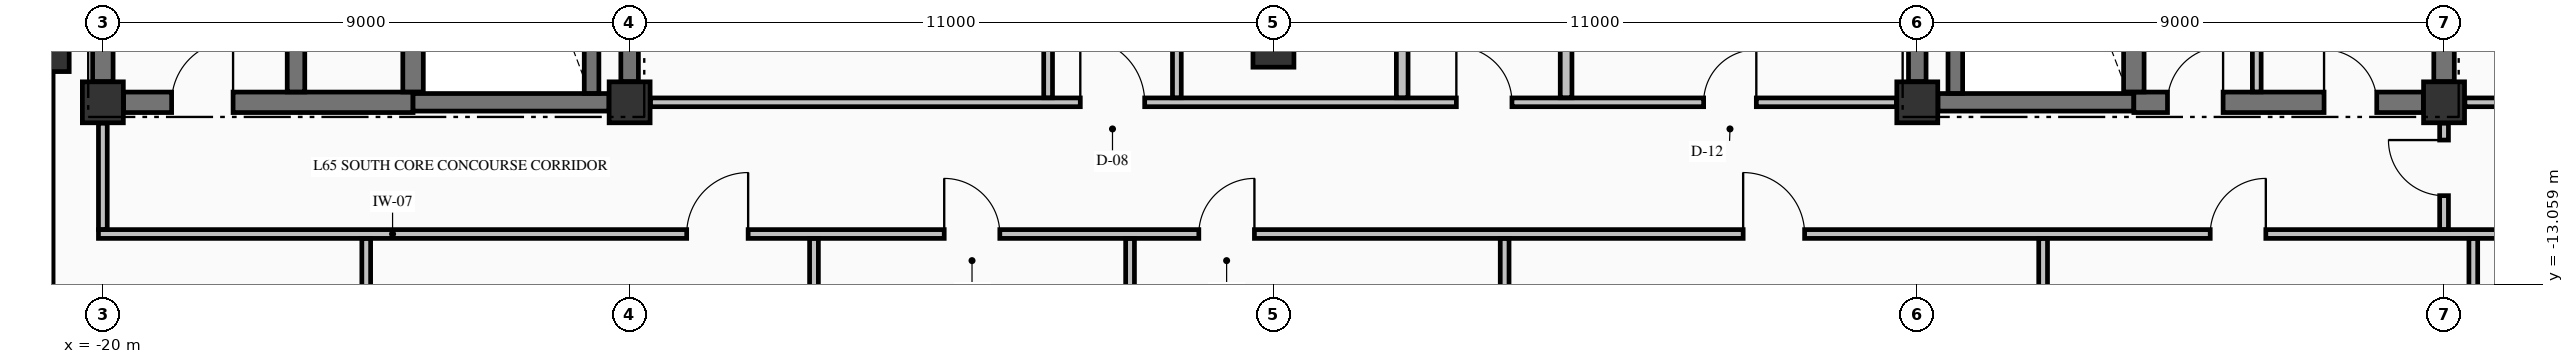
"""IFC4 building model, lengths in metres.
Left out: names, types, materials, properties, quantities, classifications, styles, units other than length and angle.
Written with IfcOpenShell. Run it as: python <this file> out.ifc"""

import sys

from ifc_helpers import new_model, si_unit, direction, frame, frame_2d, origin, origin_2d, place, context, subcontext, project, spatial, rectangle, extrude, element, fill, save


model = new_model("IFC4")
c1 = context("Model", 3, precision=1e-05, world=origin(), true_north=direction((0.0, 1.0)))
c2 = subcontext(c1, "Body", "Model", "MODEL_VIEW")
j1 = project(units=[si_unit("LENGTHUNIT", "METRE"), si_unit("PLANEANGLEUNIT", "RADIAN")], contexts=[c1])
p1 = place(None, origin())
s1 = spatial("IfcSite", under=j1, at=p1, CompositionType="ELEMENT")
p2 = place(p1, origin())
s2 = spatial("IfcBuilding", under=s1, at=p2, CompositionType="ELEMENT")
p3 = place(p2, frame((0.0, 0.0, 246.2)))
s3 = spatial("IfcBuildingStorey", under=s2, at=p3, CompositionType="ELEMENT", Elevation=246.2)
p4 = place(p3, frame((-21.0, -9.0, -0.25), z_axis=(0.0, 0.0, 1.0), x_axis=(1.0, 0.0, 0.0)))
e1 = element("IfcColumn", 1, at=p4, inside=s3, PredefinedType="COLUMN", context=c2, shape_type="SweptSolid", body=[
    extrude(rectangle(XDim=0.85, YDim=0.85, at=origin_2d()), origin(), (0.0, 0.0, 1.0), 3.055),
])
for number, where, z_axis, x_axis in (
    (2, (-20.0, -9.95, -0.25), (0.0, 0.0, 1.0), (1.0, 0.0, 0.0)),
    (3, (-11.0, -9.95, -0.25), (0.0, 0.0, 1.0), (1.0, 0.0, 0.0)),
    (4, (11.0, -9.95, -0.25), (0.0, 0.0, 1.0), (1.0, 0.0, 0.0)),
    (5, (20.0, -9.95, -0.25), (0.0, 0.0, 1.0), (1.0, 0.0, 0.0)),
    (6, (0.0, -9.0, -0.25), (0.0, 0.0, 1.0), (1.0, 0.0, 0.0)),
):
    element("IfcColumn", number, at=place(p3, frame(where, z_axis=z_axis, x_axis=x_axis)), inside=s3, PredefinedType="COLUMN", context=c2, shape_type="SweptSolid", body=[
        extrude(rectangle(XDim=0.7, YDim=0.7, at=origin_2d()), origin(), (0.0, 0.0, 1.0), 3.055),
    ])
p5 = place(p3, frame((-21.0, -9.455, 0.0), z_axis=(0.0, 0.0, 1.0), x_axis=(0.0, -1.0, 0.0)))
e7 = element("IfcWall", 7, at=p5, inside=s3, PredefinedType="STANDARD", context=c2, shape_type="SweptSolid", body=[
    extrude(rectangle(XDim=8.09, YDim=0.3, at=frame_2d((4.045, 0.0))), origin(), (0.0, 0.0, 1.0), 2.197),
])
p6 = place(p3, frame((-19.646, -9.95, 0.0), z_axis=(0.0, 0.0, 1.0), x_axis=(1.0, 0.0, 0.0)))
e8 = element("IfcWall", 8, at=p6, inside=s3, PredefinedType="SHEAR", context=c2, shape_type="SweptSolid", body=[
    extrude(rectangle(XDim=4.946, YDim=0.35, at=frame_2d((2.473, 0.0))), origin(), (0.0, 0.0, 1.0), 2.805),
])
p7 = place(p6, frame((0.821, 0.0, 0.0)))
e9 = element("IfcOpeningElement", 9, at=p7, cuts=e8, PredefinedType="OPENING", context=c2, shape_type="SweptSolid", body=[
    extrude(rectangle(XDim=1.05, YDim=2.15, at=frame_2d((0.525, 1.075))), frame((0.0, 0.185, 0.0), z_axis=(0.0, -1.0, 0.0), x_axis=(1.0, 0.0, 0.0)), (0.0, 0.0, 1.0), 0.37),
])
for number, where, z_axis, x_axis in (
    (10, (-14.7, -9.95, 0.0), (0.0, 0.0, 1.0), (1.0, 0.0, 0.0)),
    (11, (11.354, -9.95, 0.0), (0.0, 0.0, 1.0), (1.0, 0.0, 0.0)),
):
    element("IfcWall", number, at=place(p3, frame(where, z_axis=z_axis, x_axis=x_axis)), inside=s3, PredefinedType="SHEAR", context=c2, shape_type="SweptSolid", body=[
        extrude(rectangle(XDim=3.346, YDim=0.3, at=frame_2d((1.673, 0.0))), origin(), (0.0, 0.0, 1.0), 2.805),
    ])
p8 = place(p3, frame((14.7, -9.95, 0.0), z_axis=(0.0, 0.0, 1.0), x_axis=(1.0, 0.0, 0.0)))
e12 = element("IfcWall", 12, at=p8, inside=s3, PredefinedType="SHEAR", context=c2, shape_type="SweptSolid", body=[
    extrude(rectangle(XDim=4.946, YDim=0.35, at=frame_2d((2.473, 0.0))), origin(), (0.0, 0.0, 1.0), 2.805),
])
p9 = place(p8, frame((3.25, 0.0, 0.0)))
e13 = element("IfcOpeningElement", 13, at=p9, cuts=e12, PredefinedType="OPENING", context=c2, shape_type="SweptSolid", body=[
    extrude(rectangle(XDim=0.9, YDim=2.15, at=frame_2d((0.45, 1.075))), frame((0.0, 0.185, 0.0), z_axis=(0.0, -1.0, 0.0), x_axis=(1.0, 0.0, 0.0)), (0.0, 0.0, 1.0), 0.37),
])
p10 = place(p8, frame((0.575, 0.0, 0.0)))
e14 = element("IfcOpeningElement", 14, at=p10, cuts=e12, PredefinedType="OPENING", context=c2, shape_type="SweptSolid", body=[
    extrude(rectangle(XDim=0.95, YDim=2.15, at=frame_2d((0.475, 1.075))), frame((0.0, 0.185, 0.0), z_axis=(0.0, -1.0, 0.0), x_axis=(1.0, 0.0, 0.0)), (0.0, 0.0, 1.0), 0.37),
])
p11 = place(p3, frame((-20.075, -12.2, 0.0), z_axis=(0.0, 0.0, 1.0), x_axis=(1.0, 0.0, 0.0)))
e15 = element("IfcWall", 15, at=p11, inside=s3, PredefinedType="PARTITIONING", context=c2, shape_type="SweptSolid", body=[
    extrude(rectangle(XDim=45.91, YDim=0.15, at=frame_2d((22.955, 0.0))), origin(), (0.0, 0.0, 1.0), 2.805),
])
p12 = place(p11, frame((10.05, 0.0, 0.0)))
e16 = element("IfcOpeningElement", 16, at=p12, cuts=e15, PredefinedType="OPENING", context=c2, shape_type="SweptSolid", body=[
    extrude(rectangle(XDim=1.05, YDim=2.15, at=frame_2d((0.525, 1.075))), frame((0.0, 0.085, 0.0), z_axis=(0.0, -1.0, 0.0), x_axis=(1.0, 0.0, 0.0)), (0.0, 0.0, 1.0), 0.17),
])
p13 = place(p11, frame((14.45, 0.0, 0.0)))
e17 = element("IfcOpeningElement", 17, at=p13, cuts=e15, PredefinedType="OPENING", context=c2, shape_type="SweptSolid", body=[
    extrude(rectangle(XDim=0.95, YDim=2.15, at=frame_2d((0.475, 1.075))), frame((0.0, 0.085, 0.0), z_axis=(0.0, -1.0, 0.0), x_axis=(1.0, 0.0, 0.0)), (0.0, 0.0, 1.0), 0.17),
])
p14 = place(p11, frame((18.8, 0.0, 0.0)))
e18 = element("IfcOpeningElement", 18, at=p14, cuts=e15, PredefinedType="OPENING", context=c2, shape_type="SweptSolid", body=[
    extrude(rectangle(XDim=0.95, YDim=2.15, at=frame_2d((0.475, 1.075))), frame((0.0, 0.085, 0.0), z_axis=(0.0, -1.0, 0.0), x_axis=(1.0, 0.0, 0.0)), (0.0, 0.0, 1.0), 0.17),
])
p15 = place(p11, frame((28.1, 0.0, 0.0)))
e19 = element("IfcOpeningElement", 19, at=p15, cuts=e15, PredefinedType="OPENING", context=c2, shape_type="SweptSolid", body=[
    extrude(rectangle(XDim=1.05, YDim=2.15, at=frame_2d((0.525, 1.075))), frame((0.0, 0.085, 0.0), z_axis=(0.0, -1.0, 0.0), x_axis=(1.0, 0.0, 0.0)), (0.0, 0.0, 1.0), 0.17),
])
p16 = place(p11, frame((36.08, 0.0, 0.0)))
e20 = element("IfcOpeningElement", 20, at=p16, cuts=e15, PredefinedType="OPENING", context=c2, shape_type="SweptSolid", body=[
    extrude(rectangle(XDim=0.95, YDim=2.15, at=frame_2d((0.475, 1.075))), frame((0.0, 0.085, 0.0), z_axis=(0.0, -1.0, 0.0), x_axis=(1.0, 0.0, 0.0)), (0.0, 0.0, 1.0), 0.17),
])
p17 = place(p3, frame((-10.644, -9.95, 0.0), z_axis=(0.0, 0.0, 1.0), x_axis=(1.0, 0.0, 0.0)))
e21 = element("IfcWall", 21, at=p17, inside=s3, PredefinedType="PARTITIONING", context=c2, shape_type="SweptSolid", body=[
    extrude(rectangle(XDim=21.288, YDim=0.15, at=frame_2d((10.644, 0.0))), origin(), (0.0, 0.0, 1.0), 2.805),
])
p18 = place(p17, frame((7.344, 0.0, 0.0)))
e22 = element("IfcOpeningElement", 22, at=p18, cuts=e21, PredefinedType="OPENING", context=c2, shape_type="SweptSolid", body=[
    extrude(rectangle(XDim=1.1, YDim=2.15, at=frame_2d((0.55, 1.075))), frame((0.0, 0.085, 0.0), z_axis=(0.0, -1.0, 0.0), x_axis=(1.0, 0.0, 0.0)), (0.0, 0.0, 1.0), 0.17),
])
p19 = place(p17, frame((13.769, 0.0, 0.0)))
e23 = element("IfcOpeningElement", 23, at=p19, cuts=e21, PredefinedType="OPENING", context=c2, shape_type="SweptSolid", body=[
    extrude(rectangle(XDim=0.95, YDim=2.15, at=frame_2d((0.475, 1.075))), frame((0.0, 0.085, 0.0), z_axis=(0.0, -1.0, 0.0), x_axis=(1.0, 0.0, 0.0)), (0.0, 0.0, 1.0), 0.17),
])
p20 = place(p17, frame((17.994, 0.0, 0.0)))
e24 = element("IfcOpeningElement", 24, at=p20, cuts=e21, PredefinedType="OPENING", context=c2, shape_type="SweptSolid", body=[
    extrude(rectangle(XDim=0.9, YDim=2.15, at=frame_2d((0.45, 1.075))), frame((0.0, 0.085, 0.0), z_axis=(0.0, -1.0, 0.0), x_axis=(1.0, 0.0, 0.0)), (0.0, 0.0, 1.0), 0.17),
])
p21 = place(p3, frame((20.356, -9.95, 0.0), z_axis=(0.0, 0.0, 1.0), x_axis=(1.0, 0.0, 0.0)))
e25 = element("IfcWall", 25, at=p21, inside=s3, PredefinedType="PARTITIONING", context=c2, shape_type="SweptSolid", body=[
    extrude(rectangle(XDim=5.479, YDim=0.15, at=frame_2d((2.74, 0.0))), origin(), (0.0, 0.0, 1.0), 2.805),
])
p22 = place(p21, frame((2.169, 0.0, 0.0)))
e26 = element("IfcOpeningElement", 26, at=p22, cuts=e25, PredefinedType="OPENING", context=c2, shape_type="SweptSolid", body=[
    extrude(rectangle(XDim=0.95, YDim=2.15, at=frame_2d((0.475, 1.075))), frame((0.0, 0.085, 0.0), z_axis=(0.0, -1.0, 0.0), x_axis=(1.0, 0.0, 0.0)), (0.0, 0.0, 1.0), 0.17),
])
p23 = place(p3, frame((-20.0, -9.596, 0.0), z_axis=(0.0, 0.0, 1.0), x_axis=(0.0, 1.0, 0.0)))
e27 = element("IfcWall", 27, at=p23, inside=s3, PredefinedType="SHEAR", context=c2, shape_type="SweptSolid", body=[
    extrude(rectangle(XDim=9.194, YDim=0.35, at=frame_2d((4.597, 0.0))), origin(), (0.0, 0.0, 1.0), 2.805),
])
p24 = place(p3, frame((-16.7, -9.773, 0.0), z_axis=(0.0, 0.0, 1.0), x_axis=(0.0, 1.0, 0.0)))
e28 = element("IfcWall", 28, at=p24, inside=s3, PredefinedType="SHEAR", context=c2, shape_type="SweptSolid", body=[
    extrude(rectangle(XDim=9.371, YDim=0.3, at=frame_2d((4.686, 0.0))), origin(), (0.0, 0.0, 1.0), 2.805),
])
p25 = place(p3, frame((-14.7, -9.773, 0.0), z_axis=(0.0, 0.0, 1.0), x_axis=(0.0, 1.0, 0.0)))
e29 = element("IfcWall", 29, at=p25, inside=s3, PredefinedType="SHEAR", context=c2, shape_type="SweptSolid", body=[
    extrude(rectangle(XDim=9.371, YDim=0.35, at=frame_2d((4.686, 0.0))), origin(), (0.0, 0.0, 1.0), 2.805),
])
p26 = place(p3, frame((-11.65, -9.798, 0.0), z_axis=(0.0, 0.0, 1.0), x_axis=(0.0, 1.0, 0.0)))
e30 = element("IfcWall", 30, at=p26, inside=s3, PredefinedType="SOLIDWALL", context=c2, shape_type="SweptSolid", body=[
    extrude(rectangle(XDim=9.396, YDim=0.25, at=frame_2d((4.698, 0.0))), origin(), (0.0, 0.0, 1.0), 2.805),
])
for number, where, z_axis, x_axis in (
    (31, (-11.0, -9.596, 0.0), (0.0, 0.0, 1.0), (0.0, 1.0, 0.0)),
    (32, (11.0, -9.596, 0.0), (0.0, 0.0, 1.0), (0.0, 1.0, 0.0)),
):
    element("IfcWall", number, at=place(p3, frame(where, z_axis=z_axis, x_axis=x_axis)), inside=s3, PredefinedType="SHEAR", context=c2, shape_type="SweptSolid", body=[
        extrude(rectangle(XDim=9.242, YDim=0.3, at=frame_2d((4.621, 0.0))), origin(), (0.0, 0.0, 1.0), 2.805),
    ])
p27 = place(p3, frame((11.65, -9.798, 0.0), z_axis=(0.0, 0.0, 1.0), x_axis=(0.0, 1.0, 0.0)))
e33 = element("IfcWall", 33, at=p27, inside=s3, PredefinedType="SOLIDWALL", context=c2, shape_type="SweptSolid", body=[
    extrude(rectangle(XDim=9.396, YDim=0.25, at=frame_2d((4.698, 0.0))), origin(), (0.0, 0.0, 1.0), 2.805),
])
p28 = place(p3, frame((14.7, -9.773, 0.0), z_axis=(0.0, 0.0, 1.0), x_axis=(0.0, 1.0, 0.0)))
e34 = element("IfcWall", 34, at=p28, inside=s3, PredefinedType="SHEAR", context=c2, shape_type="SweptSolid", body=[
    extrude(rectangle(XDim=9.371, YDim=0.35, at=frame_2d((4.686, 0.0))), origin(), (0.0, 0.0, 1.0), 2.805),
])
p29 = place(p3, frame((20.0, -9.596, 0.0), z_axis=(0.0, 0.0, 1.0), x_axis=(0.0, 1.0, 0.0)))
e35 = element("IfcWall", 35, at=p29, inside=s3, PredefinedType="SHEAR", context=c2, shape_type="SweptSolid", body=[
    extrude(rectangle(XDim=9.242, YDim=0.35, at=frame_2d((4.621, 0.0))), origin(), (0.0, 0.0, 1.0), 2.805),
])
p30 = place(p3, frame((-20.0, -12.122, 0.0), z_axis=(0.0, 0.0, 1.0), x_axis=(0.0, 1.0, 0.0)))
e36 = element("IfcWall", 36, at=p30, inside=s3, PredefinedType="PARTITIONING", context=c2, shape_type="SweptSolid", body=[
    extrude(rectangle(XDim=1.816, YDim=0.15, at=frame_2d((0.908, 0.0))), origin(), (0.0, 0.0, 1.0), 2.395),
])
p31 = place(p3, frame((-15.5, -17.569, 0.0), z_axis=(0.0, 0.0, 1.0), x_axis=(0.0, 1.0, 0.0)))
e37 = element("IfcWall", 37, at=p31, inside=s3, PredefinedType="PARTITIONING", context=c2, shape_type="SweptSolid", body=[
    extrude(rectangle(XDim=5.291, YDim=0.15, at=frame_2d((2.646, 0.0))), origin(), (0.0, 0.0, 1.0), 2.805),
])
p32 = place(p3, frame((-7.85, -23.335, 0.0), z_axis=(0.0, 0.0, 1.0), x_axis=(0.0, 1.0, 0.0)))
e38 = element("IfcWall", 38, at=p32, inside=s3, PredefinedType="PARTITIONING", context=c2, shape_type="SweptSolid", body=[
    extrude(rectangle(XDim=11.057, YDim=0.15, at=frame_2d((5.528, 0.0))), origin(), (0.0, 0.0, 1.0), 2.805),
])
p33 = place(p3, frame((-3.85, -9.872, 0.0), z_axis=(0.0, 0.0, 1.0), x_axis=(0.0, 1.0, 0.0)))
e39 = element("IfcWall", 39, at=p33, inside=s3, PredefinedType="PARTITIONING", context=c2, shape_type="SweptSolid", body=[
    extrude(rectangle(XDim=9.544, YDim=0.15, at=frame_2d((4.772, 0.0))), origin(), (0.0, 0.0, 1.0), 2.805),
])
p34 = place(p3, frame((-2.45, -23.335, 0.0), z_axis=(0.0, 0.0, 1.0), x_axis=(0.0, 1.0, 0.0)))
e40 = element("IfcWall", 40, at=p34, inside=s3, PredefinedType="PARTITIONING", context=c2, shape_type="SweptSolid", body=[
    extrude(rectangle(XDim=11.057, YDim=0.15, at=frame_2d((5.528, 0.0))), origin(), (0.0, 0.0, 1.0), 2.805),
])
p35 = place(p3, frame((-1.65, -9.872, 0.0), z_axis=(0.0, 0.0, 1.0), x_axis=(0.0, 1.0, 0.0)))
e41 = element("IfcWall", 41, at=p35, inside=s3, PredefinedType="PARTITIONING", context=c2, shape_type="SweptSolid", body=[
    extrude(rectangle(XDim=4.419, YDim=0.15, at=frame_2d((2.209, 0.0))), origin(), (0.0, 0.0, 1.0), 2.805),
])
p36 = place(p35, frame((2.597, 0.0, 0.0)))
e42 = element("IfcOpeningElement", 42, at=p36, cuts=e41, PredefinedType="OPENING", context=c2, shape_type="SweptSolid", body=[
    extrude(rectangle(XDim=0.95, YDim=2.15, at=frame_2d((0.475, 1.075))), frame((0.0, 0.085, 0.0), z_axis=(0.0, -1.0, 0.0), x_axis=(1.0, 0.0, 0.0)), (0.0, 0.0, 1.0), 0.17),
])
p37 = place(p3, frame((2.2, -9.872, 0.0), z_axis=(0.0, 0.0, 1.0), x_axis=(0.0, 1.0, 0.0)))
e43 = element("IfcWall", 43, at=p37, inside=s3, PredefinedType="PARTITIONING", context=c2, shape_type="SweptSolid", body=[
    extrude(rectangle(XDim=4.419, YDim=0.2, at=frame_2d((2.209, 0.0))), origin(), (0.0, 0.0, 1.0), 2.805),
])
p38 = place(p3, frame((3.95, -23.335, 0.0), z_axis=(0.0, 0.0, 1.0), x_axis=(0.0, 1.0, 0.0)))
e44 = element("IfcWall", 44, at=p38, inside=s3, PredefinedType="PARTITIONING", context=c2, shape_type="SweptSolid", body=[
    extrude(rectangle(XDim=11.057, YDim=0.15, at=frame_2d((5.528, 0.0))), origin(), (0.0, 0.0, 1.0), 2.805),
])
p39 = place(p3, frame((5.0, -9.872, 0.0), z_axis=(0.0, 0.0, 1.0), x_axis=(0.0, 1.0, 0.0)))
e45 = element("IfcWall", 45, at=p39, inside=s3, PredefinedType="PARTITIONING", context=c2, shape_type="SweptSolid", body=[
    extrude(rectangle(XDim=4.419, YDim=0.2, at=frame_2d((2.209, 0.0))), origin(), (0.0, 0.0, 1.0), 2.805),
])
p40 = place(p3, frame((13.15, -23.335, 0.0), z_axis=(0.0, 0.0, 1.0), x_axis=(0.0, 1.0, 0.0)))
e46 = element("IfcWall", 46, at=p40, inside=s3, PredefinedType="PARTITIONING", context=c2, shape_type="SweptSolid", body=[
    extrude(rectangle(XDim=11.057, YDim=0.15, at=frame_2d((5.528, 0.0))), origin(), (0.0, 0.0, 1.0), 2.805),
])
p41 = place(p3, frame((16.8, -9.772, 0.0), z_axis=(0.0, 0.0, 1.0), x_axis=(0.0, 1.0, 0.0)))
e47 = element("IfcWall", 47, at=p41, inside=s3, PredefinedType="PARTITIONING", context=c2, shape_type="SweptSolid", body=[
    extrude(rectangle(XDim=7.194, YDim=0.15, at=frame_2d((3.597, 0.0))), origin(), (0.0, 0.0, 1.0), 2.805),
])
p42 = place(p3, frame((20.0, -12.122, 0.0), z_axis=(0.0, 0.0, 1.0), x_axis=(0.0, 1.0, 0.0)))
e48 = element("IfcWall", 48, at=p42, inside=s3, PredefinedType="PARTITIONING", context=c2, shape_type="SweptSolid", body=[
    extrude(rectangle(XDim=1.816, YDim=0.15, at=frame_2d((0.908, 0.0))), origin(), (0.0, 0.0, 1.0), 2.805),
])
p43 = place(p42, frame((0.577, 0.0, 0.0)))
e49 = element("IfcOpeningElement", 49, at=p43, cuts=e48, PredefinedType="OPENING", context=c2, shape_type="SweptSolid", body=[
    extrude(rectangle(XDim=0.95, YDim=2.15, at=frame_2d((0.475, 1.075))), frame((0.0, 0.085, 0.0), z_axis=(0.0, -1.0, 0.0), x_axis=(1.0, 0.0, 0.0)), (0.0, 0.0, 1.0), 0.17),
])
p44 = place(p3, frame((20.5, -17.569, 0.0), z_axis=(0.0, 0.0, 1.0), x_axis=(0.0, 1.0, 0.0)))
e50 = element("IfcWall", 50, at=p44, inside=s3, PredefinedType="PARTITIONING", context=c2, shape_type="SweptSolid", body=[
    extrude(rectangle(XDim=5.291, YDim=0.15, at=frame_2d((2.646, 0.0))), origin(), (0.0, 0.0, 1.0), 2.805),
])
p45 = place(p7, origin())
e51 = element("IfcDoor", 51, at=p45, inside=s3, OperationType="SINGLE_SWING_RIGHT", PredefinedType="DOOR", context=c2, shape_type="SweptSolid", body=[
    extrude(rectangle(XDim=1.05, YDim=2.15, at=frame_2d((0.525, 1.075))), frame((0.0, 0.025, 0.0), z_axis=(0.0, -1.0, 0.0), x_axis=(1.0, 0.0, 0.0)), (0.0, 0.0, 1.0), 0.05),
])
fill(e9, e51)
p46 = place(p9, origin())
e52 = element("IfcDoor", 52, at=p46, inside=s3, OperationType="SINGLE_SWING_LEFT", PredefinedType="DOOR", context=c2, shape_type="SweptSolid", body=[
    extrude(rectangle(XDim=0.9, YDim=2.15, at=frame_2d((0.45, 1.075))), frame((0.0, 0.025, 0.0), z_axis=(0.0, -1.0, 0.0), x_axis=(1.0, 0.0, 0.0)), (0.0, 0.0, 1.0), 0.05),
])
fill(e13, e52)
p47 = place(p10, origin())
e53 = element("IfcDoor", 53, at=p47, inside=s3, OperationType="SINGLE_SWING_RIGHT", PredefinedType="DOOR", context=c2, shape_type="SweptSolid", body=[
    extrude(rectangle(XDim=0.95, YDim=2.15, at=frame_2d((0.475, 1.075))), frame((0.0, 0.025, 0.0), z_axis=(0.0, -1.0, 0.0), x_axis=(1.0, 0.0, 0.0)), (0.0, 0.0, 1.0), 0.05),
])
fill(e14, e53)
p48 = place(p18, origin())
e54 = element("IfcDoor", 54, at=p48, inside=s3, OperationType="SINGLE_SWING_LEFT", PredefinedType="DOOR", context=c2, shape_type="SweptSolid", body=[
    extrude(rectangle(XDim=1.1, YDim=2.15, at=frame_2d((0.55, 1.075))), frame((0.0, 0.025, 0.0), z_axis=(0.0, -1.0, 0.0), x_axis=(1.0, 0.0, 0.0)), (0.0, 0.0, 1.0), 0.05),
])
fill(e22, e54)
p49 = place(p12, origin())
e55 = element("IfcDoor", 55, at=p49, inside=s3, OperationType="SINGLE_SWING_RIGHT", PredefinedType="DOOR", context=c2, shape_type="SweptSolid", body=[
    extrude(rectangle(XDim=1.05, YDim=2.15, at=frame_2d((0.525, 1.075))), frame((0.0, 0.025, 0.0), z_axis=(0.0, -1.0, 0.0), x_axis=(1.0, 0.0, 0.0)), (0.0, 0.0, 1.0), 0.05),
])
fill(e16, e55)
p50 = place(p13, origin())
e56 = element("IfcDoor", 56, at=p50, inside=s3, OperationType="SINGLE_SWING_LEFT", PredefinedType="DOOR", context=c2, shape_type="SweptSolid", body=[
    extrude(rectangle(XDim=0.95, YDim=2.15, at=frame_2d((0.475, 1.075))), frame((0.0, 0.025, 0.0), z_axis=(0.0, -1.0, 0.0), x_axis=(1.0, 0.0, 0.0)), (0.0, 0.0, 1.0), 0.05),
])
fill(e17, e56)
p51 = place(p14, origin())
e57 = element("IfcDoor", 57, at=p51, inside=s3, OperationType="SINGLE_SWING_RIGHT", PredefinedType="DOOR", context=c2, shape_type="SweptSolid", body=[
    extrude(rectangle(XDim=0.95, YDim=2.15, at=frame_2d((0.475, 1.075))), frame((0.0, 0.025, 0.0), z_axis=(0.0, -1.0, 0.0), x_axis=(1.0, 0.0, 0.0)), (0.0, 0.0, 1.0), 0.05),
])
fill(e18, e57)
p52 = place(p15, origin())
e58 = element("IfcDoor", 58, at=p52, inside=s3, OperationType="SINGLE_SWING_LEFT", PredefinedType="DOOR", context=c2, shape_type="SweptSolid", body=[
    extrude(rectangle(XDim=1.05, YDim=2.15, at=frame_2d((0.525, 1.075))), frame((0.0, 0.025, 0.0), z_axis=(0.0, -1.0, 0.0), x_axis=(1.0, 0.0, 0.0)), (0.0, 0.0, 1.0), 0.05),
])
fill(e19, e58)
p53 = place(p16, origin())
e59 = element("IfcDoor", 59, at=p53, inside=s3, OperationType="SINGLE_SWING_RIGHT", PredefinedType="DOOR", context=c2, shape_type="SweptSolid", body=[
    extrude(rectangle(XDim=0.95, YDim=2.15, at=frame_2d((0.475, 1.075))), frame((0.0, 0.025, 0.0), z_axis=(0.0, -1.0, 0.0), x_axis=(1.0, 0.0, 0.0)), (0.0, 0.0, 1.0), 0.05),
])
fill(e20, e59)
p54 = place(p19, origin())
e60 = element("IfcDoor", 60, at=p54, inside=s3, OperationType="SINGLE_SWING_LEFT", PredefinedType="DOOR", context=c2, shape_type="SweptSolid", body=[
    extrude(rectangle(XDim=0.95, YDim=2.15, at=frame_2d((0.475, 1.075))), frame((0.0, 0.025, 0.0), z_axis=(0.0, -1.0, 0.0), x_axis=(1.0, 0.0, 0.0)), (0.0, 0.0, 1.0), 0.05),
])
fill(e23, e60)
p55 = place(p20, origin())
e61 = element("IfcDoor", 61, at=p55, inside=s3, OperationType="SINGLE_SWING_RIGHT", PredefinedType="DOOR", context=c2, shape_type="SweptSolid", body=[
    extrude(rectangle(XDim=0.9, YDim=2.15, at=frame_2d((0.45, 1.075))), frame((0.0, 0.025, 0.0), z_axis=(0.0, -1.0, 0.0), x_axis=(1.0, 0.0, 0.0)), (0.0, 0.0, 1.0), 0.05),
])
fill(e24, e61)
p56 = place(p43, origin())
e62 = element("IfcDoor", 62, at=p56, inside=s3, OperationType="SINGLE_SWING_RIGHT", PredefinedType="DOOR", context=c2, shape_type="SweptSolid", body=[
    extrude(rectangle(XDim=0.95, YDim=2.15, at=frame_2d((0.475, 1.075))), frame((0.0, 0.025, 0.0), z_axis=(0.0, -1.0, 0.0), x_axis=(1.0, 0.0, 0.0)), (0.0, 0.0, 1.0), 0.05),
])
fill(e49, e62)
save(model, sys.argv[1])
